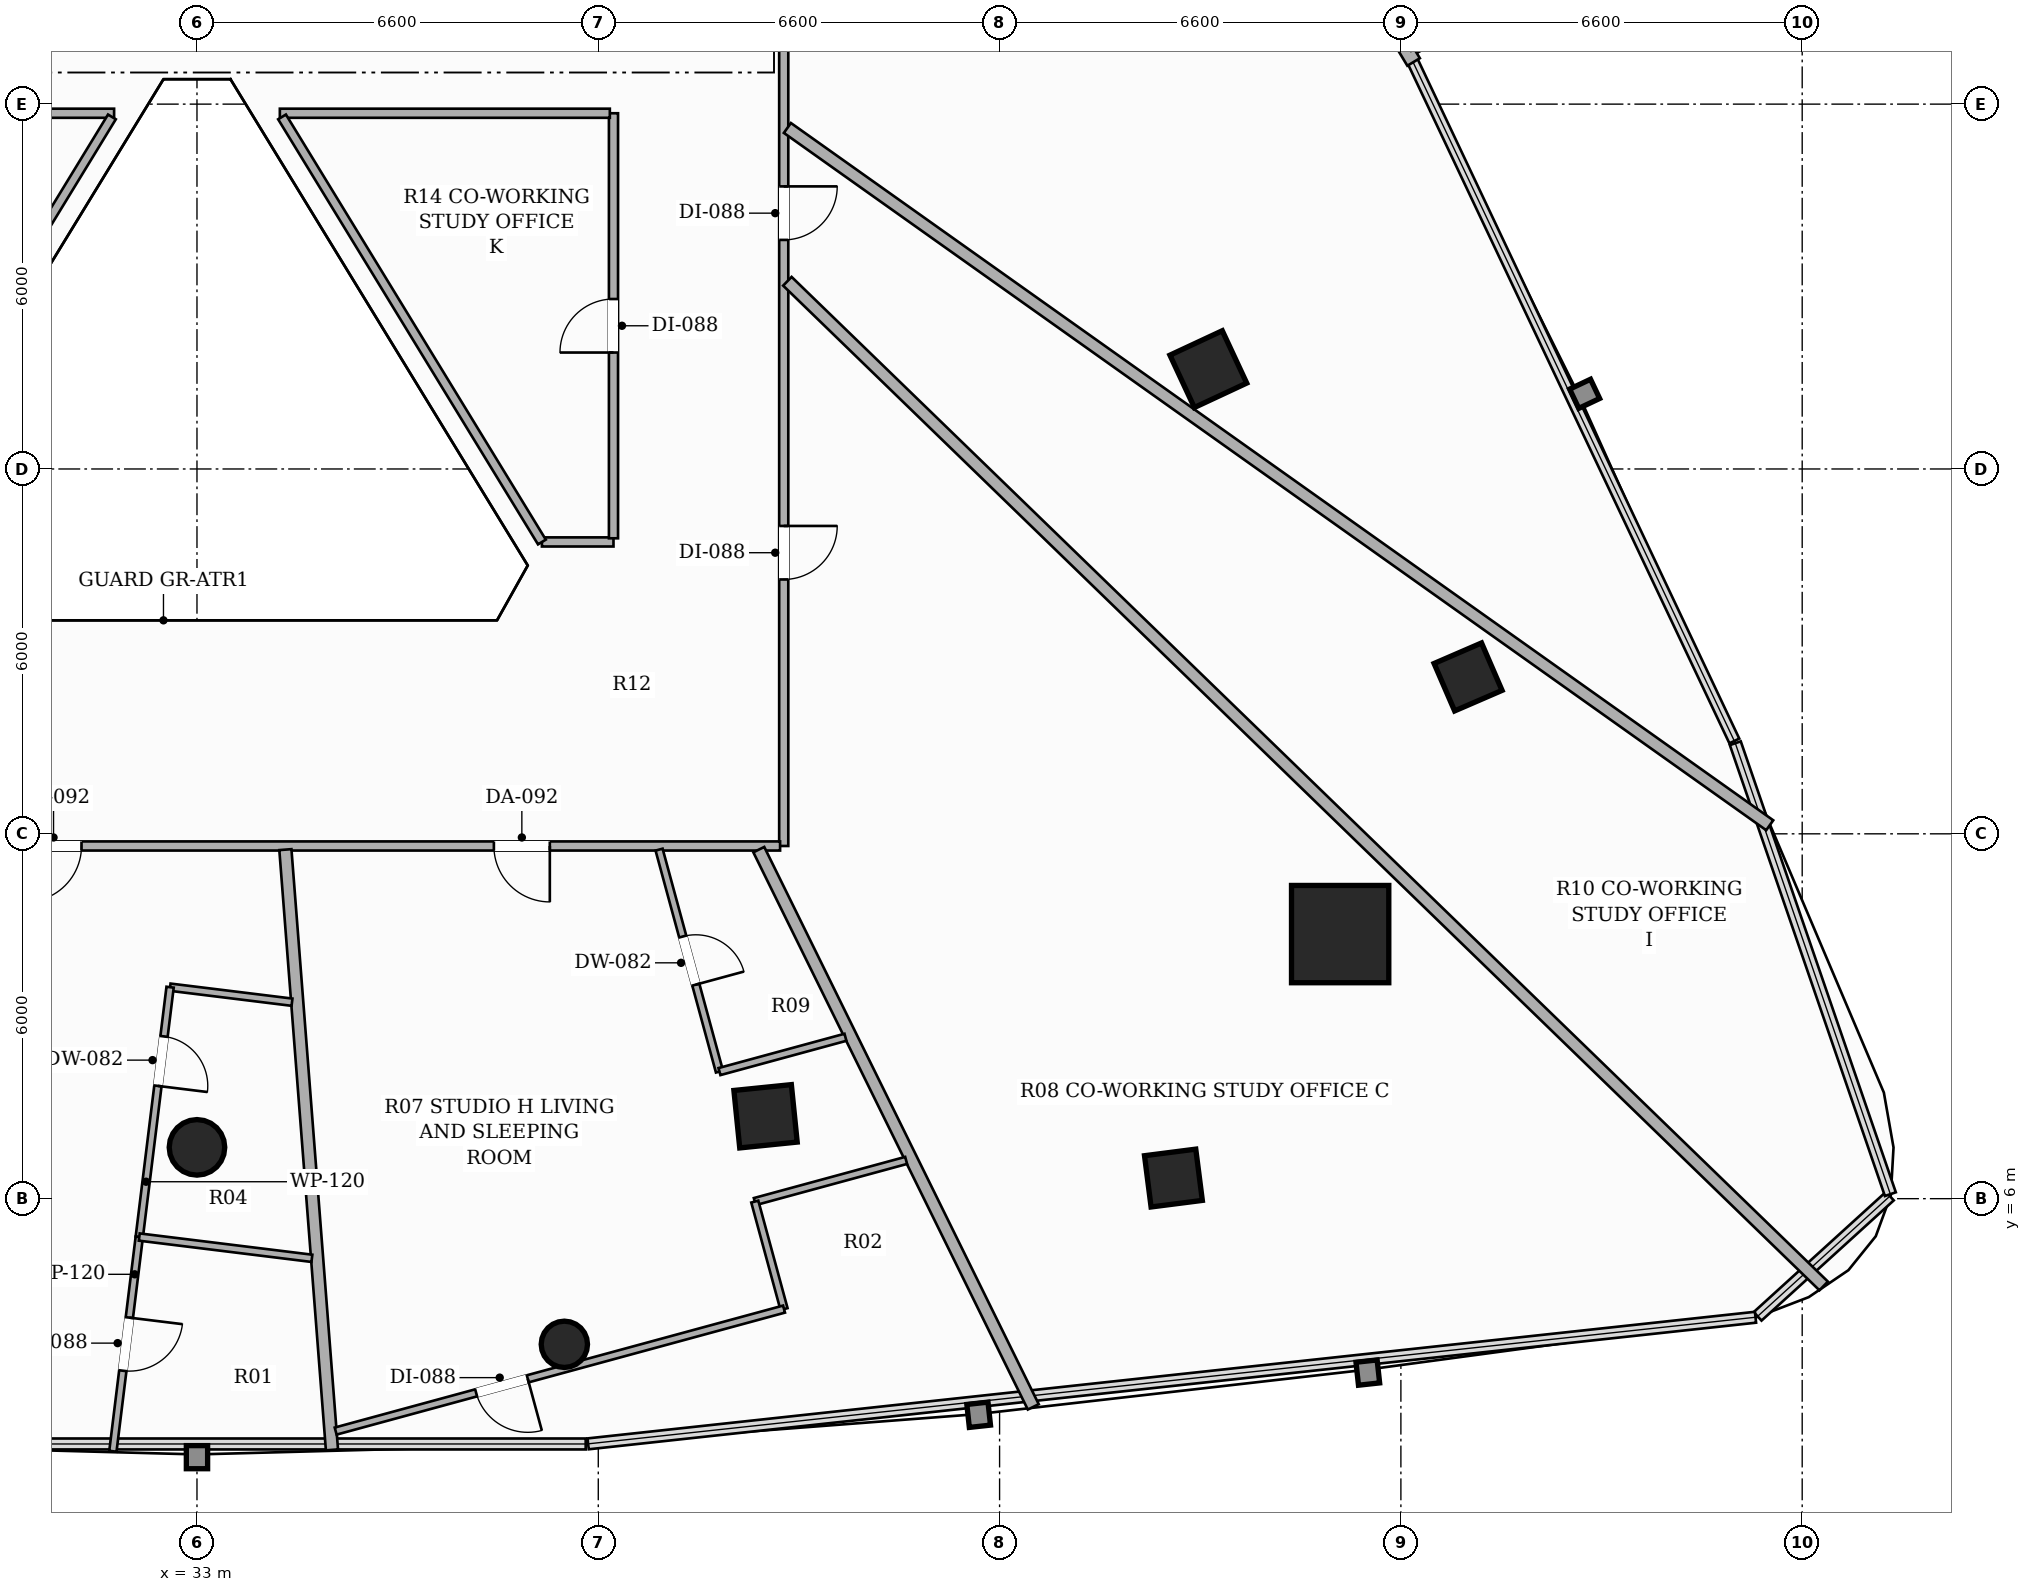
"""IFC4 building model, lengths in metres.
Left out: names, types, materials, properties, quantities, classifications, styles, units other than length and angle.
Written with IfcOpenShell. Run it as: python <this file> out.ifc"""

import sys

from ifc_helpers import new_model, si_unit, direction, frame, frame_2d, origin, origin_2d, place, context, subcontext, project, spatial, rectangle, hollow_rectangle, hollow_circle, extrude, element, fill, save


model = new_model("IFC4")
c1 = context("Model", 3, precision=1e-05, world=origin(), true_north=direction((0.0, 1.0)))
c2 = subcontext(c1, "Body", "Model", "MODEL_VIEW")
j1 = project(units=[si_unit("LENGTHUNIT", "METRE"), si_unit("PLANEANGLEUNIT", "RADIAN")], contexts=[c1])
p1 = place(None, origin())
s1 = spatial("IfcSite", under=j1, at=p1, CompositionType="ELEMENT")
p2 = place(p1, origin())
s2 = spatial("IfcBuilding", under=s1, at=p2, CompositionType="ELEMENT")
p3 = place(p2, frame((0.0, 0.0, 70.85)))
s3 = spatial("IfcBuildingStorey", under=s2, at=p3, CompositionType="ELEMENT", Elevation=70.85)
p4 = place(p3, frame((51.801, 10.351, 0.0), z_axis=(0.0, 0.0, 1.0), x_axis=(1.0, 0.0, 0.0)))
e1 = element("IfcColumn", 1, at=p4, inside=s3, PredefinedType="COLUMN", context=c2, shape_type="SweptSolid", body=[
    extrude(hollow_rectangle(XDim=1.6, YDim=1.6, WallThickness=0.05, at=origin_2d()), origin(), (0.0, 0.0, 1.0), 3.3),
])
p5 = place(p3, frame((33.0, 6.844, 0.0), z_axis=(0.0, 0.0, 1.0), x_axis=(1.0, 0.0, 0.0)))
e2 = element("IfcColumn", 2, at=p5, inside=s3, PredefinedType="COLUMN", context=c2, shape_type="SweptSolid", body=[
    extrude(hollow_circle(Radius=0.457, WallThickness=0.025, at=origin_2d()), origin(), (0.0, 0.0, 1.0), 3.3),
])
for number, where, z_axis, x_axis in (
    (3, (42.351, 7.355, 0.0), (0.0, 0.0, 1.0), (0.995, 0.101, 0.0)),
    (4, (49.633, 19.642, 0.0), (0.0, 0.0, 1.0), (-0.423, 0.906, 0.0)),
):
    element("IfcColumn", number, at=place(p3, frame(where, z_axis=z_axis, x_axis=x_axis)), inside=s3, PredefinedType="COLUMN", context=c2, shape_type="SweptSolid", body=[
        extrude(hollow_rectangle(XDim=0.95, YDim=0.95, WallThickness=0.032, at=origin_2d()), origin(), (0.0, 0.0, 1.0), 3.3),
    ])
for number, where, z_axis, x_axis in (
    (5, (49.059, 6.339, 0.0), (0.0, 0.0, 1.0), (0.992, 0.127, 0.0)),
    (6, (53.905, 14.58, 0.0), (0.0, 0.0, 1.0), (-0.397, 0.918, 0.0)),
):
    element("IfcColumn", number, at=place(p3, frame(where, z_axis=z_axis, x_axis=x_axis)), inside=s3, PredefinedType="COLUMN", context=c2, shape_type="SweptSolid", body=[
        extrude(hollow_rectangle(XDim=0.85, YDim=0.85, WallThickness=0.028, at=origin_2d()), origin(), (0.0, 0.0, 1.0), 3.3),
    ])
p6 = place(p3, frame((39.042, 3.605, 0.0), z_axis=(0.0, 0.0, 1.0), x_axis=(1.0, 0.0, 0.0)))
e7 = element("IfcColumn", 7, at=p6, inside=s3, PredefinedType="COLUMN", context=c2, shape_type="SweptSolid", body=[
    extrude(hollow_circle(Radius=0.381, WallThickness=0.022, at=origin_2d()), origin(), (0.0, 0.0, 1.0), 3.3),
])
p7 = place(p3, frame((53.009, 24.693, 0.0), z_axis=(0.0, 0.0, 1.0), x_axis=(-0.514333361126, 0.857590341382, 0.0)))
e8 = element("IfcWall", 8, at=p7, inside=s3, PredefinedType="SOLIDWALL", context=c2, shape_type="SweptSolid", body=[
    extrude(rectangle(XDim=12.603, YDim=0.24, at=frame_2d((6.301, 0.0))), origin(), (0.0, 0.0, 1.0), 2.624),
])
p8 = place(p7, frame((10.105, 0.0, 0.0)))
e9 = element("IfcOpeningElement", 9, at=p8, cuts=e8, PredefinedType="OPENING", context=c2, shape_type="SweptSolid", body=[
    extrude(rectangle(XDim=1.8, YDim=2.2, at=frame_2d((0.9, 1.1))), frame((0.0, 0.13, 0.0), z_axis=(0.0, -1.0, 0.0), x_axis=(1.0, 0.0, 0.0)), (0.0, 0.0, 1.0), 0.26),
])
p9 = place(p3, frame((42.65, 36.84, 0.0), z_axis=(0.0, 0.0, 1.0), x_axis=(0.0, -1.0, 0.0)))
e10 = element("IfcWall", 10, at=p9, inside=s3, PredefinedType="PARTITIONING", context=c2, shape_type="SweptSolid", body=[
    extrude(rectangle(XDim=25.04, YDim=0.15, at=frame_2d((12.52, 0.0))), origin(), (0.0, 0.0, 1.0), 2.413),
])
p10 = place(p9, frame((6.597, 0.0, 0.0)))
e11 = element("IfcOpeningElement", 11, at=p10, cuts=e10, PredefinedType="OPENING", context=c2, shape_type="SweptSolid", body=[
    extrude(rectangle(XDim=0.88, YDim=2.1, at=frame_2d((0.44, 1.05))), frame((0.0, 0.085, 0.0), z_axis=(0.0, -1.0, 0.0), x_axis=(1.0, 0.0, 0.0)), (0.0, 0.0, 1.0), 0.17),
])
p11 = place(p9, frame((19.777, 0.0, 0.0)))
e12 = element("IfcOpeningElement", 12, at=p11, cuts=e10, PredefinedType="OPENING", context=c2, shape_type="SweptSolid", body=[
    extrude(rectangle(XDim=0.88, YDim=2.1, at=frame_2d((0.44, 1.05))), frame((0.0, 0.085, 0.0), z_axis=(0.0, -1.0, 0.0), x_axis=(1.0, 0.0, 0.0)), (0.0, 0.0, 1.0), 0.17),
])
p12 = place(p9, frame((14.193, 0.0, 0.0)))
e13 = element("IfcOpeningElement", 13, at=p12, cuts=e10, PredefinedType="OPENING", context=c2, shape_type="SweptSolid", body=[
    extrude(rectangle(XDim=0.88, YDim=2.1, at=frame_2d((0.44, 1.05))), frame((0.0, 0.085, 0.0), z_axis=(0.0, -1.0, 0.0), x_axis=(1.0, 0.0, 0.0)), (0.0, 0.0, 1.0), 0.17),
])
p13 = place(p3, frame((42.59, 11.8, 0.0), z_axis=(0.0, 0.0, 1.0), x_axis=(-1.0, 0.0, 0.0)))
e14 = element("IfcWall", 14, at=p13, inside=s3, PredefinedType="PARTITIONING", context=c2, shape_type="SweptSolid", body=[
    extrude(rectangle(XDim=19.24, YDim=0.15, at=frame_2d((9.62, 0.0))), origin(), (0.0, 0.0, 1.0), 2.669),
])
p14 = place(p13, frame((11.489, 0.0, 0.0)))
e15 = element("IfcOpeningElement", 15, at=p14, cuts=e14, PredefinedType="OPENING", context=c2, shape_type="SweptSolid", body=[
    extrude(rectangle(XDim=0.92, YDim=2.15, at=frame_2d((0.46, 1.075))), frame((0.0, 0.085, 0.0), z_axis=(0.0, -1.0, 0.0), x_axis=(1.0, 0.0, 0.0)), (0.0, 0.0, 1.0), 0.17),
])
p15 = place(p13, frame((3.787, 0.0, 0.0)))
e16 = element("IfcOpeningElement", 16, at=p15, cuts=e14, PredefinedType="OPENING", context=c2, shape_type="SweptSolid", body=[
    extrude(rectangle(XDim=0.92, YDim=2.15, at=frame_2d((0.46, 1.075))), frame((0.0, 0.085, 0.0), z_axis=(0.0, -1.0, 0.0), x_axis=(1.0, 0.0, 0.0)), (0.0, 0.0, 1.0), 0.17),
])
p16 = place(p3, frame((31.637, 23.85, 0.0), z_axis=(0.0, 0.0, 1.0), x_axis=(-1.0, 0.0, 0.0)))
e17 = element("IfcWall", 17, at=p16, inside=s3, PredefinedType="PARTITIONING", context=c2, shape_type="SweptSolid", body=[
    extrude(rectangle(XDim=5.487, YDim=0.15, at=frame_2d((2.744, 0.0))), origin(), (0.0, 0.0, 1.0), 2.669),
])
p17 = place(p3, frame((38.673, 16.8, 0.0), z_axis=(0.0, 0.0, 1.0), x_axis=(1.0, 0.0, 0.0)))
e18 = element("IfcWall", 18, at=p17, inside=s3, PredefinedType="PARTITIONING", context=c2, shape_type="SweptSolid", body=[
    extrude(rectangle(XDim=1.177, YDim=0.15, at=frame_2d((0.588, 0.0))), origin(), (0.0, 0.0, 1.0), 3.06),
])
p18 = place(p3, frame((39.85, 16.86, 0.0), z_axis=(0.0, 0.0, 1.0), x_axis=(0.0, 1.0, 0.0)))
e19 = element("IfcWall", 19, at=p18, inside=s3, PredefinedType="PARTITIONING", context=c2, shape_type="SweptSolid", body=[
    extrude(rectangle(XDim=6.99, YDim=0.15, at=frame_2d((3.495, 0.0))), origin(), (0.0, 0.0, 1.0), 2.669),
])
p19 = place(p18, frame((3.055, 0.0, 0.0)))
e20 = element("IfcOpeningElement", 20, at=p19, cuts=e19, PredefinedType="OPENING", context=c2, shape_type="SweptSolid", body=[
    extrude(rectangle(XDim=0.88, YDim=2.1, at=frame_2d((0.44, 1.05))), frame((0.0, 0.085, 0.0), z_axis=(0.0, -1.0, 0.0), x_axis=(1.0, 0.0, 0.0)), (0.0, 0.0, 1.0), 0.17),
])
p20 = place(p3, frame((39.79, 23.85, 0.0), z_axis=(0.0, 0.0, 1.0), x_axis=(-1.0, 0.0, 0.0)))
e21 = element("IfcWall", 21, at=p20, inside=s3, PredefinedType="PARTITIONING", context=c2, shape_type="SweptSolid", body=[
    extrude(rectangle(XDim=5.427, YDim=0.15, at=frame_2d((2.713, 0.0))), origin(), (0.0, 0.0, 1.0), 2.669),
])
p21 = place(p3, frame((27.327, 16.79, 0.0), z_axis=(0.0, 0.0, 1.0), x_axis=(0.521129693902, 0.853477499489, 0.0)))
e22 = element("IfcWall", 22, at=p21, inside=s3, PredefinedType="PARTITIONING", context=c2, shape_type="SweptSolid", body=[
    extrude(rectangle(XDim=8.202, YDim=0.15, at=frame_2d((4.101, 0.0))), origin(), (0.0, 0.0, 1.0), 2.669),
])
p22 = place(p3, frame((34.399, 23.79, 0.0), z_axis=(0.0, 0.0, 1.0), x_axis=(0.521619930676, -0.853177969665, 0.0)))
e23 = element("IfcWall", 23, at=p22, inside=s3, PredefinedType="PARTITIONING", context=c2, shape_type="SweptSolid", body=[
    extrude(rectangle(XDim=8.194, YDim=0.15, at=frame_2d((4.097, 0.0))), origin(), (0.0, 0.0, 1.0), 2.669),
])
p23 = place(p3, frame((58.866, 12.141, 0.0), z_axis=(0.0, 0.0, 1.0), x_axis=(-0.815477500133, 0.578788775614, 0.0)))
e24 = element("IfcWall", 24, at=p23, inside=s3, PredefinedType="PARTITIONING", context=c2, shape_type="SweptSolid", body=[
    extrude(rectangle(XDim=19.812, YDim=0.2, at=frame_2d((9.906, 0.0))), origin(), (0.0, 0.0, 1.0), 2.413),
])
p24 = place(p3, frame((46.754, 2.576, 0.0), z_axis=(0.0, 0.0, 1.0), x_axis=(-0.441871352221, 0.897078429172, 0.0)))
e25 = element("IfcWall", 25, at=p24, inside=s3, PredefinedType="PARTITIONING", context=c2, shape_type="SweptSolid", body=[
    extrude(rectangle(XDim=10.215, YDim=0.2, at=frame_2d((5.108, 0.0))), origin(), (0.0, 0.0, 1.0), 2.413),
])
p25 = place(p3, frame((42.71, 21.087, 0.0), z_axis=(0.0, 0.0, 1.0), x_axis=(0.717996025824, -0.696047201633, 0.0)))
e26 = element("IfcWall", 26, at=p25, inside=s3, PredefinedType="PARTITIONING", context=c2, shape_type="SweptSolid", body=[
    extrude(rectangle(XDim=23.737, YDim=0.2, at=frame_2d((11.868, 0.0))), origin(), (0.0, 0.0, 1.0), 2.413),
])
p26 = place(p3, frame((34.454, 11.74, 0.0), z_axis=(0.0, 0.0, 1.0), x_axis=(0.077354581403, -0.997003645297, 0.0)))
e27 = element("IfcWall", 27, at=p26, inside=s3, PredefinedType="PARTITIONING", context=c2, shape_type="SweptSolid", body=[
    extrude(rectangle(XDim=9.901, YDim=0.2, at=frame_2d((4.95, 0.0))), origin(), (0.0, 0.0, 1.0), 2.413),
])
p27 = place(p3, frame((34.563, 9.231, 0.0), z_axis=(0.0, 0.0, 1.0), x_axis=(-0.992492062854, 0.122309055968, 0.0)))
e28 = element("IfcWall", 28, at=p27, inside=s3, PredefinedType="PARTITIONING", context=c2, shape_type="SweptSolid", body=[
    extrude(rectangle(XDim=2.02, YDim=0.12, at=frame_2d((1.01, 0.0))), origin(), (0.0, 0.0, 1.0), 2.669),
])
p28 = place(p3, frame((32.558, 9.478, 0.0), z_axis=(0.0, 0.0, 1.0), x_axis=(-0.122474226657, -0.992471694208, 0.0)))
e29 = element("IfcWall", 29, at=p28, inside=s3, PredefinedType="PARTITIONING", context=c2, shape_type="SweptSolid", body=[
    extrude(rectangle(XDim=4.14, YDim=0.12, at=frame_2d((2.07, 0.0))), origin(), (0.0, 0.0, 1.0), 2.413),
])
p29 = place(p28, frame((0.816, 0.0, 0.0)))
e30 = element("IfcOpeningElement", 30, at=p29, cuts=e29, PredefinedType="OPENING", context=c2, shape_type="SweptSolid", body=[
    extrude(rectangle(XDim=0.82, YDim=2.1, at=frame_2d((0.41, 1.05))), frame((0.0, 0.07, 0.0), z_axis=(0.0, -1.0, 0.0), x_axis=(1.0, 0.0, 0.0)), (0.0, 0.0, 1.0), 0.14),
])
p30 = place(p3, frame((32.051, 5.369, 0.0), z_axis=(0.0, 0.0, 1.0), x_axis=(-0.122290707402, -0.992494323854, 0.0)))
e31 = element("IfcWall", 31, at=p30, inside=s3, PredefinedType="PARTITIONING", context=c2, shape_type="SweptSolid", body=[
    extrude(rectangle(XDim=3.55, YDim=0.12, at=frame_2d((1.775, 0.0))), origin(), (0.0, 0.0, 1.0), 3.06),
])
p31 = place(p30, frame((1.335, 0.0, 0.0)))
e32 = element("IfcOpeningElement", 32, at=p31, cuts=e31, PredefinedType="OPENING", context=c2, shape_type="SweptSolid", body=[
    extrude(rectangle(XDim=0.88, YDim=2.1, at=frame_2d((0.44, 1.05))), frame((0.0, 0.07, 0.0), z_axis=(0.0, -1.0, 0.0), x_axis=(1.0, 0.0, 0.0)), (0.0, 0.0, 1.0), 0.14),
])
p32 = place(p3, frame((34.89, 5.019, 0.0), z_axis=(0.0, 0.0, 1.0), x_axis=(-0.992491734807, 0.12231171792, 0.0)))
e33 = element("IfcWall", 33, at=p32, inside=s3, PredefinedType="PARTITIONING", context=c2, shape_type="SweptSolid", body=[
    extrude(rectangle(XDim=2.86, YDim=0.12, at=frame_2d((1.43, 0.0))), origin(), (0.0, 0.0, 1.0), 3.06),
])
p33 = place(p3, frame((40.6, 11.74, 0.0), z_axis=(0.0, 0.0, 1.0), x_axis=(0.262500212575, -0.964931934593, 0.0)))
e34 = element("IfcWall", 34, at=p33, inside=s3, PredefinedType="PARTITIONING", context=c2, shape_type="SweptSolid", body=[
    extrude(rectangle(XDim=3.782, YDim=0.12, at=frame_2d((1.891, 0.0))), origin(), (0.0, 0.0, 1.0), 3.06),
])
p34 = place(p33, frame((1.481, 0.0, 0.0)))
e35 = element("IfcOpeningElement", 35, at=p34, cuts=e34, PredefinedType="OPENING", context=c2, shape_type="SweptSolid", body=[
    extrude(rectangle(XDim=0.82, YDim=2.1, at=frame_2d((0.41, 1.05))), frame((0.0, 0.07, 0.0), z_axis=(0.0, -1.0, 0.0), x_axis=(1.0, 0.0, 0.0)), (0.0, 0.0, 1.0), 0.14),
])
p35 = place(p3, frame((41.593, 8.09, 0.0), z_axis=(0.0, 0.0, 1.0), x_axis=(0.964897502324, 0.262626750367, 0.0)))
e36 = element("IfcWall", 36, at=p35, inside=s3, PredefinedType="PARTITIONING", context=c2, shape_type="SweptSolid", body=[
    extrude(rectangle(XDim=2.147, YDim=0.12, at=frame_2d((1.074, 0.0))), origin(), (0.0, 0.0, 1.0), 2.669),
])
p36 = place(p3, frame((44.663, 6.629, 0.0), z_axis=(0.0, 0.0, 1.0), x_axis=(-0.96494270204, -0.26246062901, 0.0)))
e37 = element("IfcWall", 37, at=p36, inside=s3, PredefinedType="PARTITIONING", context=c2, shape_type="SweptSolid", body=[
    extrude(rectangle(XDim=2.579, YDim=0.12, at=frame_2d((1.29, 0.0))), origin(), (0.0, 0.0, 1.0), 2.413),
])
p37 = place(p3, frame((42.174, 5.952, 0.0), z_axis=(0.0, 0.0, 1.0), x_axis=(0.262519741064, -0.964926621848, 0.0)))
e38 = element("IfcWall", 38, at=p37, inside=s3, PredefinedType="PARTITIONING", context=c2, shape_type="SweptSolid", body=[
    extrude(rectangle(XDim=1.832, YDim=0.12, at=frame_2d((0.916, 0.0))), origin(), (0.0, 0.0, 1.0), 3.06),
])
p38 = place(p3, frame((42.655, 4.184, 0.0), z_axis=(0.0, 0.0, 1.0), x_axis=(-0.964929508567, -0.26250913031, 0.0)))
e39 = element("IfcWall", 39, at=p38, inside=s3, PredefinedType="PARTITIONING", context=c2, shape_type="SweptSolid", body=[
    extrude(rectangle(XDim=7.642, YDim=0.12, at=frame_2d((3.821, 0.0))), origin(), (0.0, 0.0, 1.0), 2.413),
])
p39 = place(p38, frame((4.368, 0.0, 0.0)))
e40 = element("IfcOpeningElement", 40, at=p39, cuts=e39, PredefinedType="OPENING", context=c2, shape_type="SweptSolid", body=[
    extrude(rectangle(XDim=0.88, YDim=2.1, at=frame_2d((0.44, 1.05))), frame((0.0, 0.07, 0.0), z_axis=(0.0, -1.0, 0.0), x_axis=(1.0, 0.0, 0.0)), (0.0, 0.0, 1.0), 0.14),
])
p40 = place(p11, origin())
e41 = element("IfcDoor", 41, at=p40, inside=s3, OperationType="SINGLE_SWING_LEFT", PredefinedType="DOOR", context=c2, shape_type="SweptSolid", body=[
    extrude(rectangle(XDim=0.88, YDim=2.1, at=frame_2d((0.44, 1.05))), frame((0.0, 0.025, 0.0), z_axis=(0.0, -1.0, 0.0), x_axis=(1.0, 0.0, 0.0)), (0.0, 0.0, 1.0), 0.05),
])
fill(e12, e41)
p41 = place(p14, origin())
e42 = element("IfcDoor", 42, at=p41, inside=s3, OperationType="SINGLE_SWING_RIGHT", PredefinedType="DOOR", context=c2, shape_type="SweptSolid", body=[
    extrude(rectangle(XDim=0.92, YDim=2.15, at=frame_2d((0.46, 1.075))), frame((0.0, 0.025, 0.0), z_axis=(0.0, -1.0, 0.0), x_axis=(1.0, 0.0, 0.0)), (0.0, 0.0, 1.0), 0.05),
])
fill(e15, e42)
p42 = place(p29, origin())
e43 = element("IfcDoor", 43, at=p42, inside=s3, OperationType="SINGLE_SWING_RIGHT", PredefinedType="DOOR", context=c2, shape_type="SweptSolid", body=[
    extrude(rectangle(XDim=0.82, YDim=2.1, at=frame_2d((0.41, 1.05))), frame((0.0, 0.025, 0.0), z_axis=(0.0, -1.0, 0.0), x_axis=(1.0, 0.0, 0.0)), (0.0, 0.0, 1.0), 0.05),
])
fill(e30, e43)
p43 = place(p31, origin())
e44 = element("IfcDoor", 44, at=p43, inside=s3, OperationType="SINGLE_SWING_LEFT", PredefinedType="DOOR", context=c2, shape_type="SweptSolid", body=[
    extrude(rectangle(XDim=0.88, YDim=2.1, at=frame_2d((0.44, 1.05))), frame((0.0, 0.025, 0.0), z_axis=(0.0, -1.0, 0.0), x_axis=(1.0, 0.0, 0.0)), (0.0, 0.0, 1.0), 0.05),
])
fill(e32, e44)
p44 = place(p15, origin())
e45 = element("IfcDoor", 45, at=p44, inside=s3, OperationType="SINGLE_SWING_LEFT", PredefinedType="DOOR", context=c2, shape_type="SweptSolid", body=[
    extrude(rectangle(XDim=0.92, YDim=2.15, at=frame_2d((0.46, 1.075))), frame((0.0, 0.025, 0.0), z_axis=(0.0, -1.0, 0.0), x_axis=(1.0, 0.0, 0.0)), (0.0, 0.0, 1.0), 0.05),
])
fill(e16, e45)
p45 = place(p34, origin())
e46 = element("IfcDoor", 46, at=p45, inside=s3, OperationType="SINGLE_SWING_RIGHT", PredefinedType="DOOR", context=c2, shape_type="SweptSolid", body=[
    extrude(rectangle(XDim=0.82, YDim=2.1, at=frame_2d((0.41, 1.05))), frame((0.0, 0.025, 0.0), z_axis=(0.0, -1.0, 0.0), x_axis=(1.0, 0.0, 0.0)), (0.0, 0.0, 1.0), 0.05),
])
fill(e35, e46)
p46 = place(p39, origin())
e47 = element("IfcDoor", 47, at=p46, inside=s3, OperationType="SINGLE_SWING_LEFT", PredefinedType="DOOR", context=c2, shape_type="SweptSolid", body=[
    extrude(rectangle(XDim=0.88, YDim=2.1, at=frame_2d((0.44, 1.05))), frame((0.0, 0.025, 0.0), z_axis=(0.0, -1.0, 0.0), x_axis=(1.0, 0.0, 0.0)), (0.0, 0.0, 1.0), 0.05),
])
fill(e40, e47)
p47 = place(p12, origin())
e48 = element("IfcDoor", 48, at=p47, inside=s3, OperationType="SINGLE_SWING_LEFT", PredefinedType="DOOR", context=c2, shape_type="SweptSolid", body=[
    extrude(rectangle(XDim=0.88, YDim=2.1, at=frame_2d((0.44, 1.05))), frame((0.0, 0.025, 0.0), z_axis=(0.0, -1.0, 0.0), x_axis=(1.0, 0.0, 0.0)), (0.0, 0.0, 1.0), 0.05),
])
fill(e13, e48)
p48 = place(p19, origin())
e49 = element("IfcDoor", 49, at=p48, inside=s3, OperationType="SINGLE_SWING_LEFT", PredefinedType="DOOR", context=c2, shape_type="SweptSolid", body=[
    extrude(rectangle(XDim=0.88, YDim=2.1, at=frame_2d((0.44, 1.05))), frame((0.0, 0.025, 0.0), z_axis=(0.0, -1.0, 0.0), x_axis=(1.0, 0.0, 0.0)), (0.0, 0.0, 1.0), 0.05),
])
fill(e20, e49)
save(model, sys.argv[1])
